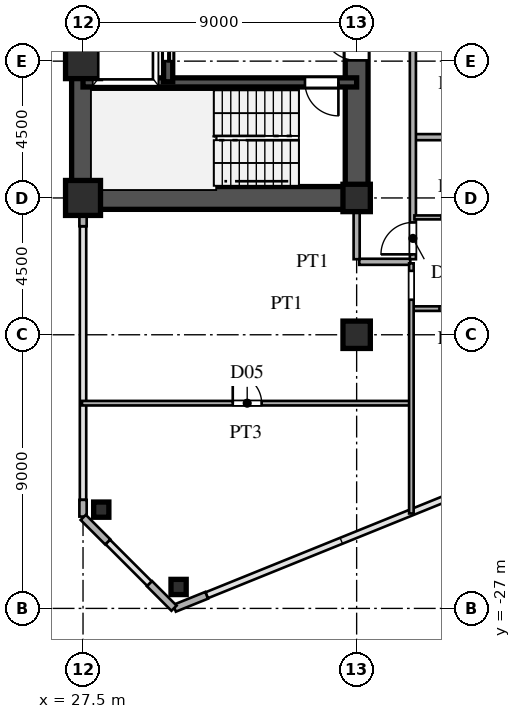
"""IFC4 building model, lengths in metres.
Left out: names, types, materials, properties, quantities, classifications, styles, units other than length and angle.
Written with IfcOpenShell. Run it as: python <this file> out.ifc"""

import sys

from ifc_helpers import new_model, si_unit, direction, frame, frame_2d, origin, origin_2d, place, context, subcontext, project, spatial, rectangle, hollow_rectangle, i_section, extrude, source, transform, mapped, element, fill, save


model = new_model("IFC4")
c1 = context("Model", 3, precision=1e-05, world=origin(), true_north=direction((0.0, 1.0)))
c2 = subcontext(c1, "Body", "Model", "MODEL_VIEW")
j1 = project(units=[si_unit("LENGTHUNIT", "METRE"), si_unit("PLANEANGLEUNIT", "RADIAN")], contexts=[c1])
p1 = place(None, origin())
s1 = spatial("IfcSite", under=j1, at=p1, CompositionType="ELEMENT")
p2 = place(p1, origin())
s2 = spatial("IfcBuilding", under=s1, at=p2, CompositionType="ELEMENT")
p3 = place(p2, frame((0.0, 0.0, 36.9)))
s3 = spatial("IfcBuildingStorey", under=s2, at=p3, CompositionType="ELEMENT", Elevation=36.9)
m1 = source(origin(), c2, "Body", "SweptSolid", [
    extrude(hollow_rectangle(XDim=1.15, YDim=1.15, WallThickness=0.048, at=origin_2d()), origin(), (0.0, 0.0, 1.0), 3.6),
])
for number, where, z_axis, x_axis in (
    (1, (27.5, -13.5, 0.0), (0.0, 0.0, 1.0), (1.0, 0.0, 0.0)),
    (2, (27.5, -9.0, 0.0), (0.0, 0.0, 1.0), (1.0, 0.0, 0.0)),
):
    element("IfcColumn", number, at=place(p3, frame(where, z_axis=z_axis, x_axis=x_axis)), inside=s3, PredefinedType="COLUMN", context=c2, shape_type="MappedRepresentation", body=[
        mapped(m1, transform((0.0, 0.0, 0.0), scale=1.0)),
    ])
m2 = source(origin(), c2, "Body", "SweptSolid", [
    extrude(i_section(OverallWidth=0.9, OverallDepth=0.9, WebThickness=0.036, FlangeThickness=0.055, at=origin_2d()), origin(), (0.0, 0.0, 1.0), 3.6),
])
for number, where, z_axis, x_axis in (
    (3, (36.5, -18.0, 0.0), (0.0, 0.0, 1.0), (1.0, 0.0, 0.0)),
    (4, (36.5, -13.5, 0.0), (0.0, 0.0, 1.0), (1.0, 0.0, 0.0)),
):
    element("IfcColumn", number, at=place(p3, frame(where, z_axis=z_axis, x_axis=x_axis)), inside=s3, PredefinedType="COLUMN", context=c2, shape_type="MappedRepresentation", body=[
        mapped(m2, transform((0.0, 0.0, 0.0), scale=1.0)),
    ])
m3 = source(origin(), c2, "Body", "SweptSolid", [
    extrude(hollow_rectangle(XDim=0.5, YDim=0.5, WallThickness=0.02, at=origin_2d()), origin(), (0.0, 0.0, 1.0), 3.6),
])
for number, where, z_axis, x_axis in (
    (5, (30.643, -26.295, 0.0), (0.0, 0.0, 1.0), (1.0, 0.0, 0.0)),
    (6, (28.1, -23.751, 0.0), (0.0, 0.0, 1.0), (1.0, 0.0, 0.0)),
):
    element("IfcColumn", number, at=place(p3, frame(where, z_axis=z_axis, x_axis=x_axis)), inside=s3, PredefinedType="COLUMN", context=c2, shape_type="MappedRepresentation", body=[
        mapped(m3, transform((0.0, 0.0, 0.0), scale=1.0)),
    ])
p4 = place(p3, frame((30.509, -26.996, 0.0), z_axis=(0.0, 0.0, 1.0), x_axis=(0.927007103665, 0.375043770452, 0.0)))
e7 = element("IfcWall", 7, at=p4, inside=s3, PredefinedType="SOLIDWALL", context=c2, shape_type="SweptSolid", body=[
    extrude(rectangle(XDim=1.14, YDim=0.24, at=frame_2d((0.57, 0.0))), origin(), (0.0, 0.0, 1.0), 3.38),
])
p5 = place(p3, frame((27.5, -23.98, 0.0), z_axis=(0.0, 0.0, 1.0), x_axis=(0.0, 1.0, 0.0)))
e8 = element("IfcWall", 8, at=p5, inside=s3, PredefinedType="SOLIDWALL", context=c2, shape_type="SweptSolid", body=[
    extrude(rectangle(XDim=0.55, YDim=0.24, at=frame_2d((0.275, 0.0))), origin(), (0.0, 0.0, 1.0), 3.38),
])
p6 = place(p3, frame((27.5, -14.43, 0.0), z_axis=(0.0, 0.0, 1.0), x_axis=(0.0, 1.0, 0.0)))
e9 = element("IfcWall", 9, at=p6, inside=s3, PredefinedType="SOLIDWALL", context=c2, shape_type="SweptSolid", body=[
    extrude(rectangle(XDim=0.55, YDim=0.24, at=frame_2d((0.275, 0.0))), origin(), (0.0, 0.0, 1.0), 2.88),
])
for number, where, z_axis, x_axis in (
    (10, (27.507, -24.007, 0.0), (0.0, 0.0, 1.0), (0.707, -0.707, 0.0)),
    (11, (29.687, -26.187, 0.0), (0.0, 0.0, 1.0), (0.707, -0.707, 0.0)),
):
    element("IfcWall", number, at=place(p3, frame(where, z_axis=z_axis, x_axis=x_axis)), inside=s3, PredefinedType="SOLIDWALL", context=c2, shape_type="SweptSolid", body=[
        extrude(rectangle(XDim=1.14, YDim=0.24, at=frame_2d((0.57, 0.0))), origin(), (0.0, 0.0, 1.0), 3.38),
    ])
p7 = place(p3, frame((27.5, -13.5, 0.0), z_axis=(0.0, 0.0, 1.0), x_axis=(0.0, 1.0, 0.0)))
e12 = element("IfcWall", 12, at=p7, inside=s3, PredefinedType="SHEAR", context=c2, shape_type="SweptSolid", body=[
    extrude(rectangle(XDim=12.2, YDim=0.75, at=frame_2d((6.1, 0.0))), origin(), (0.0, 0.0, 1.0), 3.38),
])
p8 = place(p3, frame((27.5, -13.5, 0.0), z_axis=(0.0, 0.0, 1.0), x_axis=(1.0, 0.0, 0.0)))
e13 = element("IfcWall", 13, at=p8, inside=s3, PredefinedType="SHEAR", context=c2, shape_type="SweptSolid", body=[
    extrude(rectangle(XDim=9.0, YDim=0.75, at=frame_2d((4.5, 0.0))), origin(), (0.0, 0.0, 1.0), 3.38),
])
p9 = place(p3, frame((36.5, -13.65, 0.0), z_axis=(0.0, 0.0, 1.0), x_axis=(0.0, 1.0, 0.0)))
e14 = element("IfcWall", 14, at=p9, inside=s3, PredefinedType="SHEAR", context=c2, shape_type="SweptSolid", body=[
    extrude(rectangle(XDim=7.15, YDim=0.75, at=frame_2d((3.575, 0.0))), origin(), (0.0, 0.0, 1.0), 3.38),
])
p10 = place(p9, frame((4.675, 0.0, 0.0)))
e15 = element("IfcOpeningElement", 15, at=p10, cuts=e14, PredefinedType="OPENING", context=c2, shape_type="SweptSolid", body=[
    extrude(rectangle(XDim=1.15, YDim=2.2, at=frame_2d((0.575, 1.1))), frame((0.0, 0.385, 0.0), z_axis=(0.0, -1.0, 0.0), x_axis=(1.0, 0.0, 0.0)), (0.0, 0.0, 1.0), 0.77),
])
p11 = place(p3, frame((27.5, -9.7, 0.0), z_axis=(0.0, 0.0, 1.0), x_axis=(1.0, 0.0, 0.0)))
e16 = element("IfcWall", 16, at=p11, inside=s3, PredefinedType="SHEAR", context=c2, shape_type="SweptSolid", body=[
    extrude(rectangle(XDim=9.0, YDim=0.3, at=frame_2d((4.5, 0.0))), origin(), (0.0, 0.0, 1.0), 3.38),
])
p12 = place(p11, frame((7.3, 0.0, 0.0)))
e17 = element("IfcOpeningElement", 17, at=p12, cuts=e16, PredefinedType="OPENING", context=c2, shape_type="SweptSolid", body=[
    extrude(rectangle(XDim=1.1, YDim=2.2, at=frame_2d((0.55, 1.1))), frame((0.0, 0.16, 0.0), z_axis=(0.0, -1.0, 0.0), x_axis=(1.0, 0.0, 0.0)), (0.0, 0.0, 1.0), 0.32),
])
p13 = place(p3, frame((30.3, -9.68, 0.0), z_axis=(0.0, 0.0, 1.0), x_axis=(0.0, 1.0, 0.0)))
e18 = element("IfcWall", 18, at=p13, inside=s3, PredefinedType="SHEAR", context=c2, shape_type="SweptSolid", body=[
    extrude(rectangle(XDim=2.56, YDim=0.3, at=frame_2d((1.28, 0.0))), origin(), (0.0, 0.0, 1.0), 3.38),
])
p14 = place(p13, frame((0.68, 0.0, 0.0)))
e19 = element("IfcOpeningElement", 19, at=p14, cuts=e18, PredefinedType="OPENING", context=c2, shape_type="SweptSolid", body=[
    extrude(rectangle(XDim=1.2, YDim=2.25, at=frame_2d((0.6, 1.125))), frame((0.0, 0.16, 0.0), z_axis=(0.0, -1.0, 0.0), x_axis=(1.0, 0.0, 0.0)), (0.0, 0.0, 1.0), 0.32),
])
p15 = place(p3, frame((27.465, -20.25, 0.0), z_axis=(0.0, 0.0, 1.0), x_axis=(1.0, 0.0, 0.0)))
e20 = element("IfcWall", 20, at=p15, inside=s3, PredefinedType="PARTITIONING", context=c2, shape_type="SweptSolid", body=[
    extrude(rectangle(XDim=10.785, YDim=0.15, at=frame_2d((5.393, 0.0))), origin(), (0.0, 0.0, 1.0), 3.38),
])
p16 = place(p15, frame((4.96, 0.0, 0.0)))
e21 = element("IfcOpeningElement", 21, at=p16, cuts=e20, PredefinedType="OPENING", context=c2, shape_type="SweptSolid", body=[
    extrude(rectangle(XDim=0.95, YDim=2.15, at=frame_2d((0.475, 1.075))), frame((0.0, 0.085, 0.0), z_axis=(0.0, -1.0, 0.0), x_axis=(1.0, 0.0, 0.0)), (0.0, 0.0, 1.0), 0.17),
])
p17 = place(p3, frame((38.35, -17.14, 0.0), z_axis=(0.0, 0.0, 1.0), x_axis=(1.0, 0.0, 0.0)))
e22 = element("IfcWall", 22, at=p17, inside=s3, PredefinedType="PARTITIONING", context=c2, shape_type="SweptSolid", body=[
    extrude(rectangle(XDim=2.7, YDim=0.15, at=frame_2d((1.35, 0.0))), origin(), (0.0, 0.0, 1.0), 3.38),
])
p18 = place(p17, frame((0.875, 0.0, 0.0)))
e23 = element("IfcOpeningElement", 23, at=p18, cuts=e22, PredefinedType="OPENING", context=c2, shape_type="SweptSolid", body=[
    extrude(rectangle(XDim=0.95, YDim=2.15, at=frame_2d((0.475, 1.075))), frame((0.0, 0.085, 0.0), z_axis=(0.0, -1.0, 0.0), x_axis=(1.0, 0.0, 0.0)), (0.0, 0.0, 1.0), 0.17),
])
p19 = place(p3, frame((36.585, -15.6, 0.0), z_axis=(0.0, 0.0, 1.0), x_axis=(1.0, 0.0, 0.0)))
e24 = element("IfcWall", 24, at=p19, inside=s3, PredefinedType="PARTITIONING", context=c2, shape_type="SweptSolid", body=[
    extrude(rectangle(XDim=1.68, YDim=0.2, at=frame_2d((0.84, 0.0))), origin(), (0.0, 0.0, 1.0), 3.38),
])
p20 = place(p3, frame((38.4, -14.14, 0.0), z_axis=(0.0, 0.0, 1.0), x_axis=(1.0, 0.0, 0.0)))
e25 = element("IfcWall", 25, at=p20, inside=s3, PredefinedType="PARTITIONING", context=c2, shape_type="SweptSolid", body=[
    extrude(rectangle(XDim=2.65, YDim=0.13, at=frame_2d((1.325, 0.0))), origin(), (0.0, 0.0, 1.0), 3.38),
])
p21 = place(p20, frame((0.885, 0.0, 0.0)))
e26 = element("IfcOpeningElement", 26, at=p21, cuts=e25, PredefinedType="OPENING", context=c2, shape_type="SweptSolid", body=[
    extrude(rectangle(XDim=0.88, YDim=2.1, at=frame_2d((0.44, 1.05))), frame((0.0, 0.075, 0.0), z_axis=(0.0, -1.0, 0.0), x_axis=(1.0, 0.0, 0.0)), (0.0, 0.0, 1.0), 0.15),
])
p22 = place(p3, frame((38.43, -11.5, 0.0), z_axis=(0.0, 0.0, 1.0), x_axis=(1.0, 0.0, 0.0)))
e27 = element("IfcWall", 27, at=p22, inside=s3, PredefinedType="PARTITIONING", context=c2, shape_type="SweptSolid", body=[
    extrude(rectangle(XDim=30.377, YDim=0.2, at=frame_2d((15.188, 0.0))), origin(), (0.0, 0.0, 1.0), 3.38),
])
p23 = place(p3, frame((36.5, -15.515, 0.0), z_axis=(0.0, 0.0, 1.0), x_axis=(0.0, 1.0, 0.0)))
e28 = element("IfcWall", 28, at=p23, inside=s3, PredefinedType="PARTITIONING", context=c2, shape_type="SweptSolid", body=[
    extrude(rectangle(XDim=1.635, YDim=0.2, at=frame_2d((0.817, 0.0))), origin(), (0.0, 0.0, 1.0), 2.68),
])
p24 = place(p3, frame((38.3, -23.878, 0.0), z_axis=(0.0, 0.0, 1.0), x_axis=(0.0, 1.0, 0.0)))
e29 = element("IfcWall", 29, at=p24, inside=s3, PredefinedType="PARTITIONING", context=c2, shape_type="SweptSolid", body=[
    extrude(rectangle(XDim=8.228, YDim=0.15, at=frame_2d((4.114, 0.0))), origin(), (0.0, 0.0, 1.0), 3.38),
])
p25 = place(p24, frame((7.031, 0.0, 0.0)))
e30 = element("IfcOpeningElement", 30, at=p25, cuts=e29, PredefinedType="OPENING", context=c2, shape_type="SweptSolid", body=[
    extrude(rectangle(XDim=0.95, YDim=2.15, at=frame_2d((0.475, 1.075))), frame((0.0, 0.085, 0.0), z_axis=(0.0, -1.0, 0.0), x_axis=(1.0, 0.0, 0.0)), (0.0, 0.0, 1.0), 0.17),
])
p26 = place(p3, frame((38.35, -15.515, 0.0), z_axis=(0.0, 0.0, 1.0), x_axis=(0.0, 1.0, 0.0)))
e31 = element("IfcWall", 31, at=p26, inside=s3, PredefinedType="PARTITIONING", context=c2, shape_type="SweptSolid", body=[
    extrude(rectangle(XDim=31.03, YDim=0.2, at=frame_2d((15.515, 0.0))), origin(), (0.0, 0.0, 1.0), 3.38),
])
p27 = place(p26, frame((0.16, 0.0, 0.0)))
e32 = element("IfcOpeningElement", 32, at=p27, cuts=e31, PredefinedType="OPENING", context=c2, shape_type="SweptSolid", body=[
    extrude(rectangle(XDim=1.05, YDim=2.25, at=frame_2d((0.525, 1.125))), frame((0.0, 0.11, 0.0), z_axis=(0.0, -1.0, 0.0), x_axis=(1.0, 0.0, 0.0)), (0.0, 0.0, 1.0), 0.22),
])
p28 = place(p26, frame((9.067, 0.0, 0.0)))
e33 = element("IfcOpeningElement", 33, at=p28, cuts=e31, PredefinedType="OPENING", context=c2, shape_type="SweptSolid", body=[
    extrude(rectangle(XDim=1.05, YDim=2.25, at=frame_2d((0.525, 1.125))), frame((0.0, 0.11, 0.0), z_axis=(0.0, -1.0, 0.0), x_axis=(1.0, 0.0, 0.0)), (0.0, 0.0, 1.0), 0.22),
])
p29 = place(p26, frame((20.567, 0.0, 0.0)))
e34 = element("IfcOpeningElement", 34, at=p29, cuts=e31, PredefinedType="OPENING", context=c2, shape_type="SweptSolid", body=[
    extrude(rectangle(XDim=1.05, YDim=2.25, at=frame_2d((0.525, 1.125))), frame((0.0, 0.11, 0.0), z_axis=(0.0, -1.0, 0.0), x_axis=(1.0, 0.0, 0.0)), (0.0, 0.0, 1.0), 0.22),
])
p30 = place(p26, frame((29.82, 0.0, 0.0)))
e35 = element("IfcOpeningElement", 35, at=p30, cuts=e31, PredefinedType="OPENING", context=c2, shape_type="SweptSolid", body=[
    extrude(rectangle(XDim=1.05, YDim=2.25, at=frame_2d((0.525, 1.125))), frame((0.0, 0.11, 0.0), z_axis=(0.0, -1.0, 0.0), x_axis=(1.0, 0.0, 0.0)), (0.0, 0.0, 1.0), 0.22),
])
m4 = source(origin(), c2, "Body", "SweptSolid", [
    extrude(rectangle(XDim=1.15, YDim=2.2, at=frame_2d((0.575, 1.1))), frame((0.0, 0.025, 0.0), z_axis=(0.0, -1.0, 0.0), x_axis=(1.0, 0.0, 0.0)), (0.0, 0.0, 1.0), 0.05),
])
p31 = place(p10, origin())
e36 = element("IfcDoor", 36, at=p31, inside=s3, OperationType="SINGLE_SWING_RIGHT", PredefinedType="DOOR", context=c2, shape_type="MappedRepresentation", body=[
    mapped(m4, transform((0.0, 0.0, 0.0), scale=1.0)),
])
fill(e15, e36)
m5 = source(origin(), c2, "Body", "SweptSolid", [
    extrude(rectangle(XDim=1.1, YDim=2.2, at=frame_2d((0.55, 1.1))), frame((0.0, 0.025, 0.0), z_axis=(0.0, -1.0, 0.0), x_axis=(1.0, 0.0, 0.0)), (0.0, 0.0, 1.0), 0.05),
])
p32 = place(p12, frame((1.1, 0.0, 0.0), z_axis=(0.0, 0.0, 1.0), x_axis=(-1.0, 0.0, 0.0)))
e37 = element("IfcDoor", 37, at=p32, inside=s3, OperationType="SINGLE_SWING_RIGHT", PredefinedType="DOOR", context=c2, shape_type="MappedRepresentation", body=[
    mapped(m5, transform((0.0, 0.0, 0.0), scale=1.0)),
])
fill(e17, e37)
m6 = source(origin(), c2, "Body", "SweptSolid", [
    extrude(rectangle(XDim=1.2, YDim=2.25, at=frame_2d((0.6, 1.125))), frame((0.0, 0.025, 0.0), z_axis=(0.0, -1.0, 0.0), x_axis=(1.0, 0.0, 0.0)), (0.0, 0.0, 1.0), 0.05),
])
p33 = place(p14, origin())
e38 = element("IfcDoor", 38, at=p33, inside=s3, OperationType="DOUBLE_DOOR_SLIDING", PredefinedType="DOOR", context=c2, shape_type="MappedRepresentation", body=[
    mapped(m6, transform((0.0, 0.0, 0.0), scale=1.0)),
])
fill(e19, e38)
m7 = source(origin(), c2, "Body", "SweptSolid", [
    extrude(rectangle(XDim=0.95, YDim=2.15, at=frame_2d((0.475, 1.075))), frame((0.0, 0.025, 0.0), z_axis=(0.0, -1.0, 0.0), x_axis=(1.0, 0.0, 0.0)), (0.0, 0.0, 1.0), 0.05),
])
p34 = place(p16, origin())
e39 = element("IfcDoor", 39, at=p34, inside=s3, OperationType="SINGLE_SWING_LEFT", PredefinedType="DOOR", context=c2, shape_type="MappedRepresentation", body=[
    mapped(m7, transform((0.0, 0.0, 0.0), scale=1.0)),
])
fill(e21, e39)
m8 = source(origin(), c2, "Body", "SweptSolid", [
    extrude(rectangle(XDim=0.88, YDim=2.1, at=frame_2d((0.44, 1.05))), frame((0.0, 0.025, 0.0), z_axis=(0.0, -1.0, 0.0), x_axis=(1.0, 0.0, 0.0)), (0.0, 0.0, 1.0), 0.05),
])
p35 = place(p21, origin())
e40 = element("IfcDoor", 40, at=p35, inside=s3, OperationType="SINGLE_SWING_RIGHT", PredefinedType="DOOR", context=c2, shape_type="MappedRepresentation", body=[
    mapped(m8, transform((0.0, 0.0, 0.0), scale=1.0)),
])
fill(e26, e40)
m9 = source(origin(), c2, "Body", "SweptSolid", [
    extrude(rectangle(XDim=1.05, YDim=2.25, at=frame_2d((0.525, 1.125))), frame((0.0, 0.025, 0.0), z_axis=(0.0, -1.0, 0.0), x_axis=(1.0, 0.0, 0.0)), (0.0, 0.0, 1.0), 0.05),
])
p36 = place(p27, origin())
e41 = element("IfcDoor", 41, at=p36, inside=s3, OperationType="SINGLE_SWING_LEFT", PredefinedType="DOOR", context=c2, shape_type="MappedRepresentation", body=[
    mapped(m9, transform((0.0, 0.0, 0.0), scale=1.0)),
])
fill(e32, e41)
save(model, sys.argv[1])
